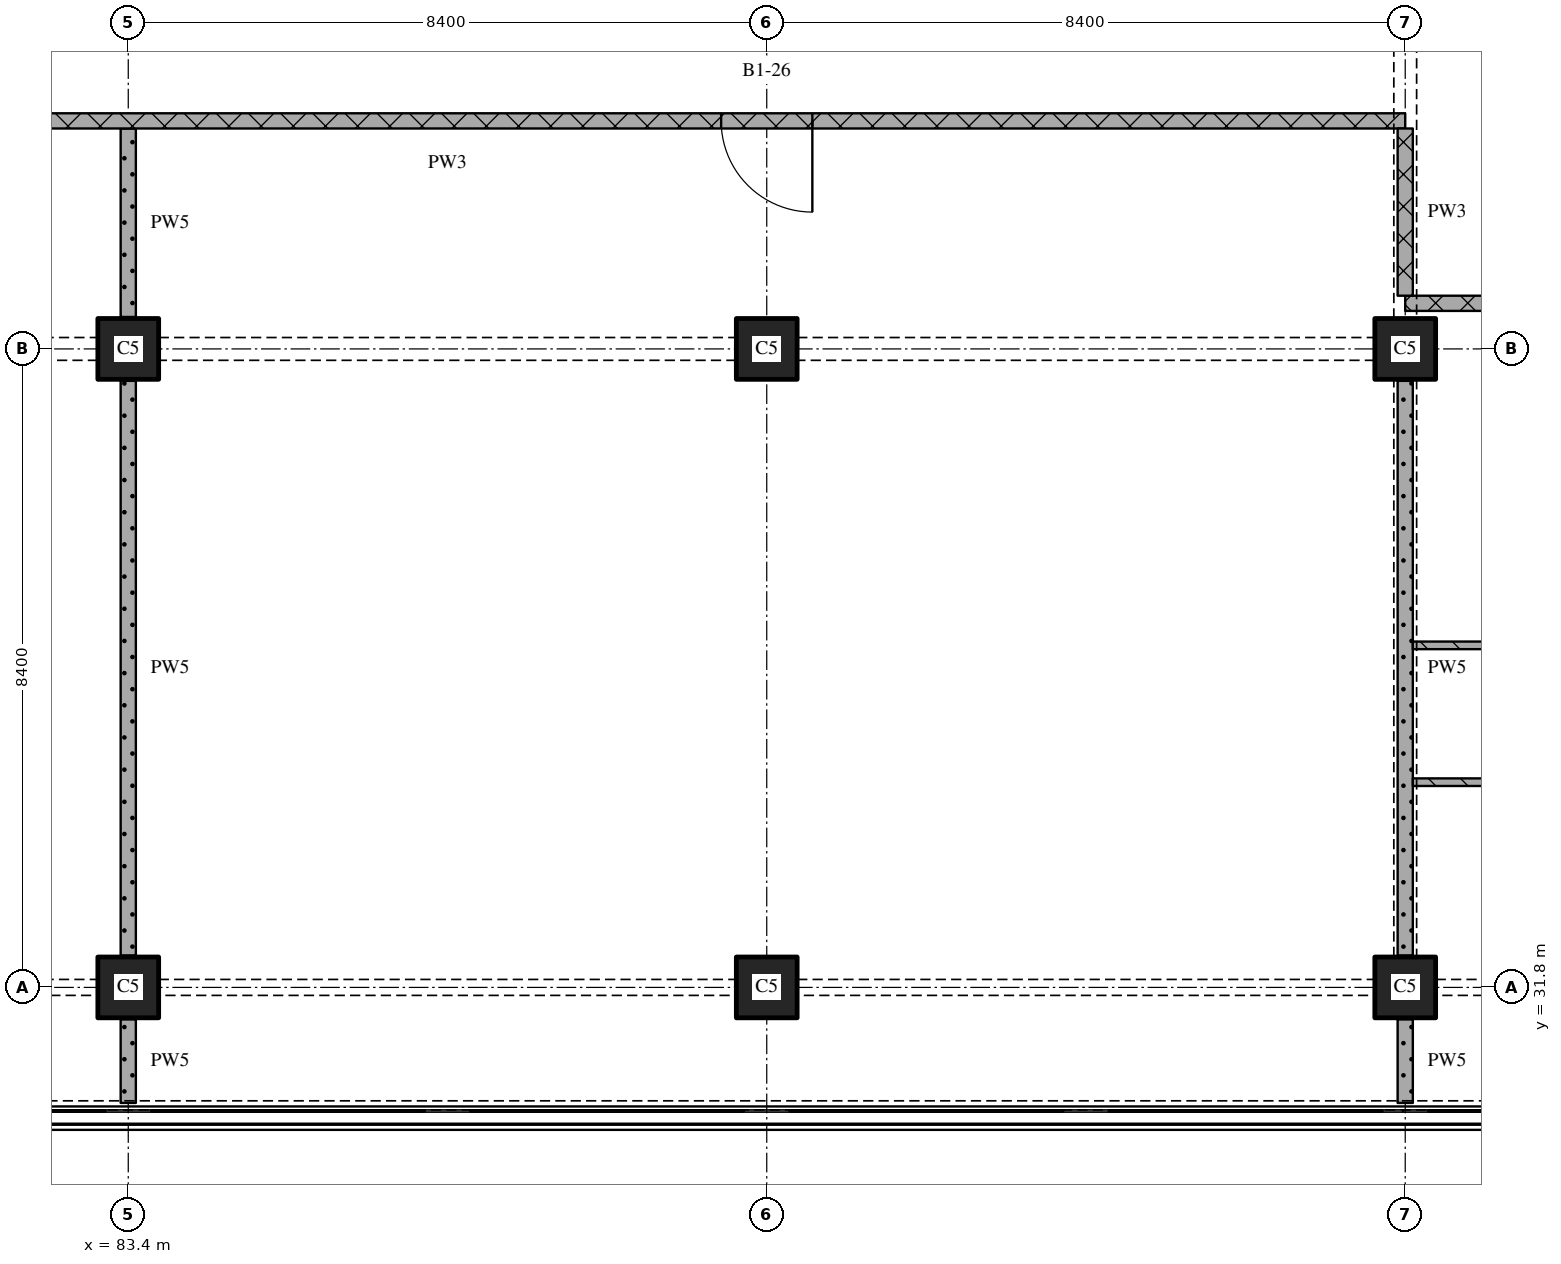
"""IFC4 building model, lengths in metres.
Left out: names, types, materials, properties, quantities, classifications, styles, units other than length and angle.
Written with IfcOpenShell. Run it as: python <this file> out.ifc"""

import sys

from ifc_helpers import new_model, si_unit, direction, frame, frame_2d, origin, origin_2d, place, context, subcontext, project, spatial, rectangle, extrude, element, fill, save


model = new_model("IFC4")
c1 = context("Model", 3, precision=1e-05, world=origin(), true_north=direction((0.0, 1.0)))
c2 = subcontext(c1, "Body", "Model", "MODEL_VIEW")
j1 = project(units=[si_unit("LENGTHUNIT", "METRE"), si_unit("PLANEANGLEUNIT", "RADIAN")], contexts=[c1])
p1 = place(None, origin())
s1 = spatial("IfcSite", under=j1, at=p1, CompositionType="ELEMENT")
p2 = place(p1, origin())
s2 = spatial("IfcBuilding", under=s1, at=p2, CompositionType="ELEMENT")
p3 = place(p2, frame((0.0, 0.0, 102.45)))
s3 = spatial("IfcBuildingStorey", under=s2, at=p3, CompositionType="ELEMENT", Elevation=102.45)
for number, where, z_axis, x_axis in (
    (1, (83.4, 31.8, 0.0), (0.0, 0.0, 1.0), (1.0, 0.0, 0.0)),
    (2, (83.4, 40.2, 0.0), (0.0, 0.0, 1.0), (1.0, 0.0, 0.0)),
    (3, (91.8, 31.8, 0.0), (0.0, 0.0, 1.0), (1.0, 0.0, 0.0)),
    (4, (91.8, 40.2, 0.0), (0.0, 0.0, 1.0), (1.0, 0.0, 0.0)),
    (5, (100.2, 31.8, 0.0), (0.0, 0.0, 1.0), (1.0, 0.0, 0.0)),
    (6, (100.2, 40.2, 0.0), (0.0, 0.0, 1.0), (1.0, 0.0, 0.0)),
):
    element("IfcColumn", number, at=place(p3, frame(where, z_axis=z_axis, x_axis=x_axis)), inside=s3, PredefinedType="COLUMN", context=c2, shape_type="SweptSolid", body=[
        extrude(rectangle(XDim=0.8, YDim=0.8, at=origin_2d()), origin(), (0.0, 0.0, 1.0), 3.6),
    ])
p4 = place(p3, frame((117.0, 34.5, 0.0), z_axis=(0.0, 0.0, 1.0), x_axis=(-1.0, 0.0, 0.0)))
e7 = element("IfcWall", 7, at=p4, inside=s3, PredefinedType="PARTITIONING", context=c2, shape_type="SweptSolid", body=[
    extrude(rectangle(XDim=16.7, YDim=0.1, at=frame_2d((8.35, 0.0))), origin(), (0.0, 0.0, 1.0), 3.32),
])
p5 = place(p4, frame((12.15, 0.0, 0.0)))
e8 = element("IfcOpeningElement", 8, at=p5, cuts=e7, PredefinedType="OPENING", context=c2, shape_type="SweptSolid", body=[
    extrude(rectangle(XDim=0.9, YDim=2.1, at=frame_2d((0.45, 1.05))), frame((0.0, 0.06, 0.0), z_axis=(0.0, -1.0, 0.0), x_axis=(1.0, 0.0, 0.0)), (0.0, 0.0, 1.0), 0.12),
])
p6 = place(p3, frame((100.3, 36.3, 0.0), z_axis=(0.0, 0.0, 1.0), x_axis=(1.0, 0.0, 0.0)))
e9 = element("IfcWall", 9, at=p6, inside=s3, PredefinedType="PARTITIONING", context=c2, shape_type="SweptSolid", body=[
    extrude(rectangle(XDim=9.2, YDim=0.1, at=frame_2d((4.6, 0.0))), origin(), (0.0, 0.0, 1.0), 3.32),
])
p7 = place(p6, frame((1.75, 0.0, 0.0)))
e10 = element("IfcOpeningElement", 10, at=p7, cuts=e9, PredefinedType="OPENING", context=c2, shape_type="SweptSolid", body=[
    extrude(rectangle(XDim=0.8, YDim=2.1, at=frame_2d((0.4, 1.05))), frame((0.0, 0.06, 0.0), z_axis=(0.0, -1.0, 0.0), x_axis=(1.0, 0.0, 0.0)), (0.0, 0.0, 1.0), 0.12),
])
p8 = place(p3, frame((124.38, 40.8, 0.0), z_axis=(0.0, 0.0, 1.0), x_axis=(-1.0, 0.0, 0.0)))
e11 = element("IfcWall", 11, at=p8, inside=s3, PredefinedType="PARTITIONING", context=c2, shape_type="SweptSolid", body=[
    extrude(rectangle(XDim=24.18, YDim=0.2, at=frame_2d((12.09, 0.0))), origin(), (0.0, 0.0, 1.0), 3.32),
])
p9 = place(p8, frame((13.63, 0.0, 0.0)))
e12 = element("IfcOpeningElement", 12, at=p9, cuts=e11, PredefinedType="OPENING", context=c2, shape_type="SweptSolid", body=[
    extrude(rectangle(XDim=1.0, YDim=2.1, at=frame_2d((0.5, 1.05))), frame((0.0, 0.11, 0.0), z_axis=(0.0, -1.0, 0.0), x_axis=(1.0, 0.0, 0.0)), (0.0, 0.0, 1.0), 0.22),
])
p10 = place(p3, frame((100.2, 43.2, 0.0), z_axis=(0.0, 0.0, 1.0), x_axis=(-1.0, 0.0, 0.0)))
e13 = element("IfcWall", 13, at=p10, inside=s3, PredefinedType="PARTITIONING", context=c2, shape_type="SweptSolid", body=[
    extrude(rectangle(XDim=25.2, YDim=0.2, at=frame_2d((12.6, 0.0))), origin(), (0.0, 0.0, 1.0), 3.32),
])
p11 = place(p10, frame((7.8, 0.0, 0.0)))
e14 = element("IfcOpeningElement", 14, at=p11, cuts=e13, PredefinedType="OPENING", context=c2, shape_type="SweptSolid", body=[
    extrude(rectangle(XDim=1.2, YDim=2.1, at=frame_2d((0.6, 1.05))), frame((0.0, 0.11, 0.0), z_axis=(0.0, -1.0, 0.0), x_axis=(1.0, 0.0, 0.0)), (0.0, 0.0, 1.0), 0.22),
])
p12 = place(p10, frame((20.4, 0.0, 0.0)))
e15 = element("IfcOpeningElement", 15, at=p12, cuts=e13, PredefinedType="OPENING", context=c2, shape_type="SweptSolid", body=[
    extrude(rectangle(XDim=1.2, YDim=2.1, at=frame_2d((0.6, 1.05))), frame((0.0, 0.11, 0.0), z_axis=(0.0, -1.0, 0.0), x_axis=(1.0, 0.0, 0.0)), (0.0, 0.0, 1.0), 0.22),
])
p13 = place(p3, frame((83.4, 31.38, 0.0), z_axis=(0.0, 0.0, 1.0), x_axis=(0.0, -1.0, 0.0)))
e16 = element("IfcWall", 16, at=p13, inside=s3, PredefinedType="PARTITIONING", context=c2, shape_type="SweptSolid", body=[
    extrude(rectangle(XDim=1.1, YDim=0.2, at=frame_2d((0.55, 0.0))), origin(), (0.0, 0.0, 1.0), 3.32),
])
p14 = place(p3, frame((83.4, 39.78, 0.0), z_axis=(0.0, 0.0, 1.0), x_axis=(0.0, -1.0, 0.0)))
e17 = element("IfcWall", 17, at=p14, inside=s3, PredefinedType="PARTITIONING", context=c2, shape_type="SweptSolid", body=[
    extrude(rectangle(XDim=7.56, YDim=0.2, at=frame_2d((3.78, 0.0))), origin(), (0.0, 0.0, 1.0), 3.32),
])
p15 = place(p3, frame((83.4, 43.1, 0.0), z_axis=(0.0, 0.0, 1.0), x_axis=(0.0, -1.0, 0.0)))
e18 = element("IfcWall", 18, at=p15, inside=s3, PredefinedType="PARTITIONING", context=c2, shape_type="SweptSolid", body=[
    extrude(rectangle(XDim=2.48, YDim=0.2, at=frame_2d((1.24, 0.0))), origin(), (0.0, 0.0, 1.0), 3.32),
])
p16 = place(p3, frame((100.2, 43.1, 0.0), z_axis=(0.0, 0.0, 1.0), x_axis=(0.0, -1.0, 0.0)))
e19 = element("IfcWall", 19, at=p16, inside=s3, PredefinedType="PARTITIONING", context=c2, shape_type="SweptSolid", body=[
    extrude(rectangle(XDim=2.2, YDim=0.2, at=frame_2d((1.1, 0.0))), origin(), (0.0, 0.0, 1.0), 2.43),
])
p17 = place(p3, frame((100.2, 31.38, 0.0), z_axis=(0.0, 0.0, 1.0), x_axis=(0.0, -1.0, 0.0)))
e20 = element("IfcWall", 20, at=p17, inside=s3, PredefinedType="PARTITIONING", context=c2, shape_type="SweptSolid", body=[
    extrude(rectangle(XDim=1.1, YDim=0.2, at=frame_2d((0.55, 0.0))), origin(), (0.0, 0.0, 1.0), 3.32),
])
p18 = place(p3, frame((100.2, 39.78, 0.0), z_axis=(0.0, 0.0, 1.0), x_axis=(0.0, -1.0, 0.0)))
e21 = element("IfcWall", 21, at=p18, inside=s3, PredefinedType="PARTITIONING", context=c2, shape_type="SweptSolid", body=[
    extrude(rectangle(XDim=7.56, YDim=0.2, at=frame_2d((3.78, 0.0))), origin(), (0.0, 0.0, 1.0), 2.83),
])
p19 = place(p11, origin())
e22 = element("IfcDoor", 22, at=p19, inside=s3, OperationType="SINGLE_SWING_LEFT", PredefinedType="DOOR", context=c2, shape_type="SweptSolid", body=[
    extrude(rectangle(XDim=1.2, YDim=2.1, at=frame_2d((0.6, 1.05))), frame((0.0, 0.025, 0.0), z_axis=(0.0, -1.0, 0.0), x_axis=(1.0, 0.0, 0.0)), (0.0, 0.0, 1.0), 0.05),
])
fill(e14, e22)
save(model, sys.argv[1])
